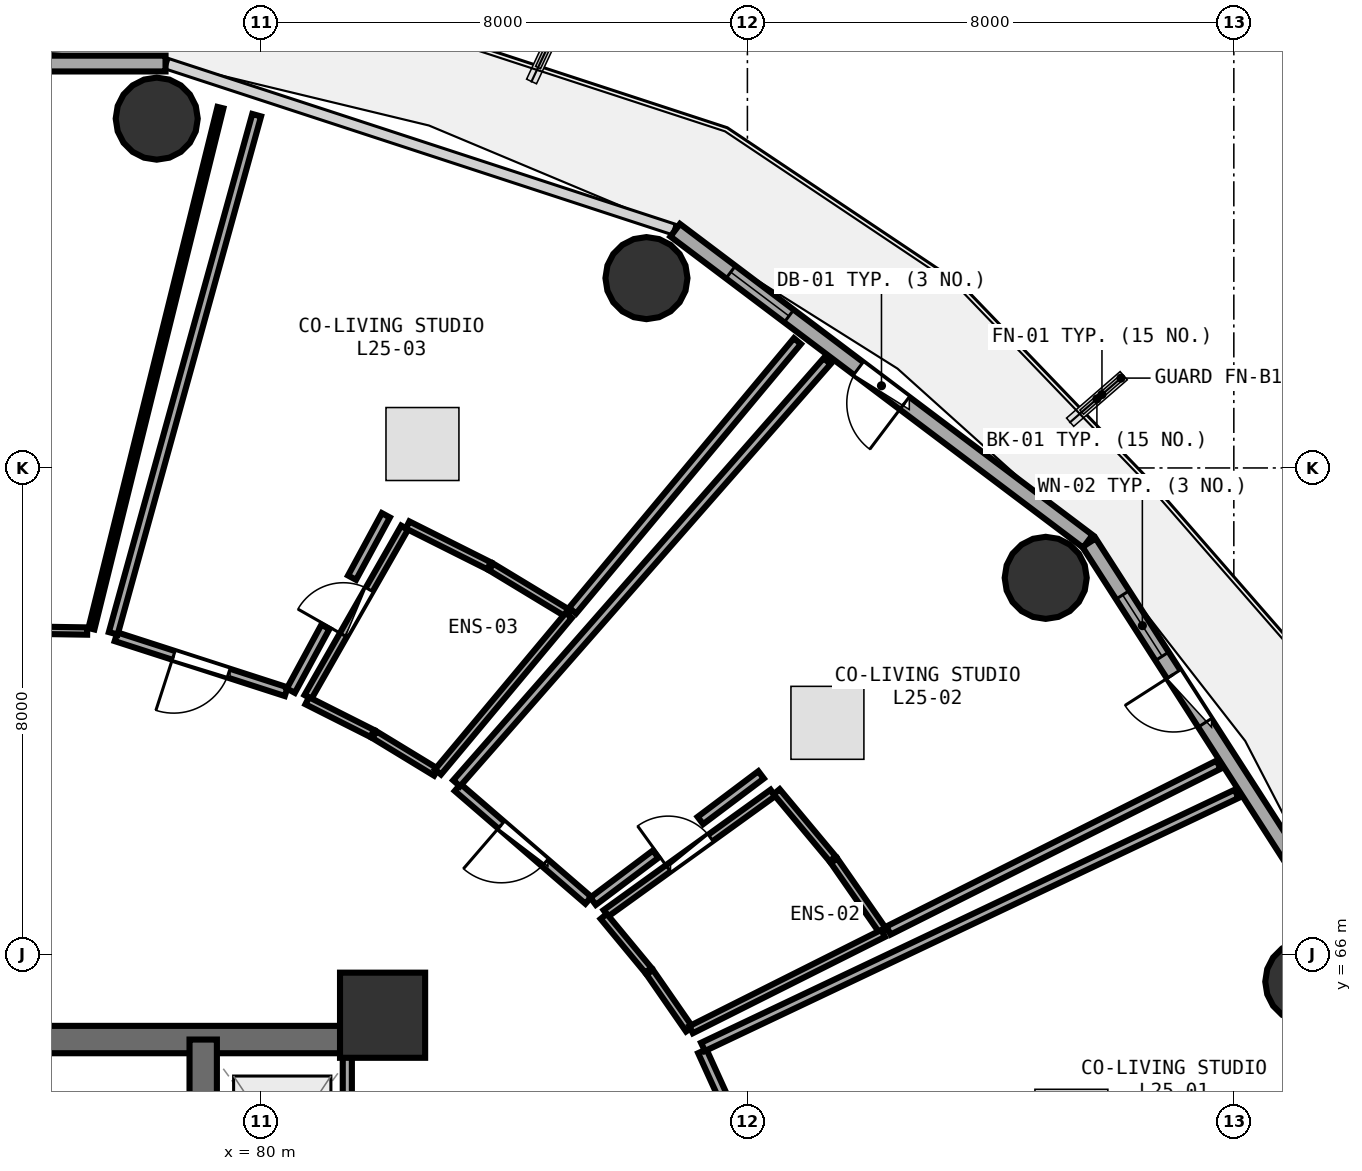
"""IFC4 building model, lengths in metres.
Left out: names, types, materials, properties, quantities, classifications, styles, units other than length and angle.
Written with IfcOpenShell. Run it as: python <this file> out.ifc"""

import sys

from ifc_helpers import new_model, si_unit, direction, frame, frame_2d, origin, origin_2d, place, context, subcontext, project, spatial, rectangle, circle, extrude, element, fill, save


model = new_model("IFC4")
c1 = context("Model", 3, precision=1e-05, world=origin(), true_north=direction((0.0, 1.0)))
c2 = subcontext(c1, "Body", "Model", "MODEL_VIEW")
j1 = project(units=[si_unit("LENGTHUNIT", "METRE"), si_unit("PLANEANGLEUNIT", "RADIAN")], contexts=[c1])
p1 = place(None, origin())
s1 = spatial("IfcSite", under=j1, at=p1, CompositionType="ELEMENT")
p2 = place(p1, origin())
s2 = spatial("IfcBuilding", under=s1, at=p2, CompositionType="ELEMENT")
p3 = place(p2, frame((0.0, 0.0, 98.85)))
s3 = spatial("IfcBuildingStorey", under=s2, at=p3, CompositionType="ELEMENT", Elevation=98.85)
p4 = place(p3, frame((82.0, 65.0, 0.0), z_axis=(0.0, 0.0, 1.0), x_axis=(1.0, 0.0, 0.0)))
e1 = element("IfcColumn", 1, at=p4, inside=s3, PredefinedType="PILASTER", context=c2, shape_type="SweptSolid", body=[
    extrude(rectangle(XDim=1.4, YDim=1.4, at=origin_2d()), origin(), (0.0, 0.0, 1.0), 3.75),
])
for number, where, z_axis, x_axis in (
    (2, (97.192, 65.552, 0.0), (0.0, 0.0, 1.0), (1.0, 0.0, 0.0)),
    (3, (92.906, 72.193, 0.0), (0.0, 0.0, 1.0), (1.0, 0.0, 0.0)),
    (4, (86.34, 77.122, 0.0), (0.0, 0.0, 1.0), (1.0, 0.0, 0.0)),
    (5, (78.286, 79.745, 0.0), (0.0, 0.0, 1.0), (1.0, 0.0, 0.0)),
):
    element("IfcColumn", number, at=place(p3, frame(where, z_axis=z_axis, x_axis=x_axis)), inside=s3, PredefinedType="COLUMN", context=c2, shape_type="SweptSolid", body=[
        extrude(circle(Radius=0.675, at=origin_2d()), origin(), (0.0, 0.0, 1.0), 3.75),
    ])
p5 = place(p3, frame((98.048, 65.879, 0.0), z_axis=(0.0, 0.0, 1.0), x_axis=(-0.540620528459, 0.841266571432, 0.0)))
e6 = element("IfcWall", 6, at=p5, inside=s3, PredefinedType="SOLIDWALL", context=c2, shape_type="SweptSolid", body=[
    extrude(rectangle(XDim=8.193, YDim=0.26, at=frame_2d((4.096, 0.0))), origin(), (0.0, 0.0, 1.0), 3.475),
])
p6 = place(p5, frame((4.671, 0.0, 0.0)))
e7 = element("IfcOpeningElement", 7, at=p6, cuts=e6, PredefinedType="OPENING", context=c2, shape_type="SweptSolid", body=[
    extrude(rectangle(XDim=0.95, YDim=2.1, at=frame_2d((0.475, 1.05))), frame((0.0, 0.14, 0.0), z_axis=(0.0, -1.0, 0.0), x_axis=(1.0, 0.0, 0.0)), (0.0, 0.0, 1.0), 0.28),
])
p7 = place(p5, frame((5.971, 0.0, 0.85)))
e8 = element("IfcOpeningElement", 8, at=p7, cuts=e6, PredefinedType="OPENING", context=c2, shape_type="SweptSolid", body=[
    extrude(rectangle(XDim=1.2, YDim=1.45, at=frame_2d((0.6, 0.725))), frame((0.0, 0.14, 0.0), z_axis=(0.0, -1.0, 0.0), x_axis=(1.0, 0.0, 0.0)), (0.0, 0.0, 1.0), 0.28),
])
p8 = place(p3, frame((93.599, 72.793, 0.0), z_axis=(0.0, 0.0, 1.0), x_axis=(-0.798501507879, 0.601992808857, 0.0)))
e9 = element("IfcWall", 9, at=p8, inside=s3, PredefinedType="SOLIDWALL", context=c2, shape_type="SweptSolid", body=[
    extrude(rectangle(XDim=8.499, YDim=0.26, at=frame_2d((4.25, 0.0))), origin(), (0.0, 0.0, 1.0), 3.475),
])
p9 = place(p8, frame((3.775, 0.0, 0.0)))
e10 = element("IfcOpeningElement", 10, at=p9, cuts=e9, PredefinedType="OPENING", context=c2, shape_type="SweptSolid", body=[
    extrude(rectangle(XDim=0.95, YDim=2.1, at=frame_2d((0.475, 1.05))), frame((0.0, 0.14, 0.0), z_axis=(0.0, -1.0, 0.0), x_axis=(1.0, 0.0, 0.0)), (0.0, 0.0, 1.0), 0.28),
])
p10 = place(p8, frame((6.155, 0.0, 0.85)))
e11 = element("IfcOpeningElement", 11, at=p10, cuts=e9, PredefinedType="OPENING", context=c2, shape_type="SweptSolid", body=[
    extrude(rectangle(XDim=1.2, YDim=1.45, at=frame_2d((0.6, 0.725))), frame((0.0, 0.14, 0.0), z_axis=(0.0, -1.0, 0.0), x_axis=(1.0, 0.0, 0.0)), (0.0, 0.0, 1.0), 0.28),
])
p11 = place(p3, frame((78.43, 80.651, 0.0), z_axis=(0.0, 0.0, 1.0), x_axis=(-1.0, 0.0, 0.0)))
e12 = element("IfcWall", 12, at=p11, inside=s3, PredefinedType="SOLIDWALL", context=c2, shape_type="SweptSolid", body=[
    extrude(rectangle(XDim=8.861, YDim=0.26, at=frame_2d((4.43, 0.0))), origin(), (0.0, 0.0, 1.0), 3.475),
])
p12 = place(p11, frame((3.63, 0.0, 0.85)))
e13 = element("IfcOpeningElement", 13, at=p12, cuts=e12, PredefinedType="OPENING", context=c2, shape_type="SweptSolid", body=[
    extrude(rectangle(XDim=1.6, YDim=1.45, at=frame_2d((0.8, 0.725))), frame((0.0, 0.14, 0.0), z_axis=(0.0, -1.0, 0.0), x_axis=(1.0, 0.0, 0.0)), (0.0, 0.0, 1.0), 0.28),
])
p13 = place(p3, frame((74.0, 64.6, 0.0), z_axis=(0.0, 0.0, 1.0), x_axis=(1.0, 0.0, 0.0)))
e14 = element("IfcWall", 14, at=p13, inside=s3, PredefinedType="SHEAR", context=c2, shape_type="SweptSolid", body=[
    extrude(rectangle(XDim=8.0, YDim=0.45, at=frame_2d((4.0, 0.0))), origin(), (0.0, 0.0, 1.0), 3.49),
])
p14 = place(p3, frame((79.05, 58.3, 0.0), z_axis=(0.0, 0.0, 1.0), x_axis=(0.0, 1.0, 0.0)))
e15 = element("IfcWall", 15, at=p14, inside=s3, PredefinedType="SHEAR", context=c2, shape_type="SweptSolid", body=[
    extrude(rectangle(XDim=6.3, YDim=0.45, at=frame_2d((3.15, 0.0))), origin(), (0.0, 0.0, 1.0), 3.49),
])
p15 = place(p3, frame((81.42, 61.48, 0.0), z_axis=(0.0, 0.0, 1.0), x_axis=(0.0, 1.0, 0.0)))
e16 = element("IfcWall", 16, at=p15, inside=s3, PredefinedType="PARTITIONING", context=c2, shape_type="SweptSolid", body=[
    extrude(rectangle(XDim=2.84, YDim=0.15, at=frame_2d((1.42, 0.0))), origin(), (0.0, 0.0, 1.0), 3.48),
])
p16 = place(p3, frame((88.387, 61.925, 0.0), z_axis=(0.0, 0.0, 1.0), x_axis=(-0.413748987938, 0.910391001153, 0.0)))
e17 = element("IfcWall", 17, at=p16, inside=s3, PredefinedType="PARTITIONING", context=c2, shape_type="SweptSolid", body=[
    extrude(rectangle(XDim=2.727, YDim=0.15, at=frame_2d((1.364, 0.0))), origin(), (0.0, 0.0, 1.0), 3.235),
])
p17 = place(p16, frame((0.889, 0.0, 0.0)))
e18 = element("IfcOpeningElement", 18, at=p17, cuts=e17, PredefinedType="OPENING", context=c2, shape_type="SweptSolid", body=[
    extrude(rectangle(XDim=0.95, YDim=2.08, at=frame_2d((0.475, 1.04))), frame((0.0, 0.085, 0.0), z_axis=(0.0, -1.0, 0.0), x_axis=(1.0, 0.0, 0.0)), (0.0, 0.0, 1.0), 0.17),
])
p18 = place(p3, frame((85.673, 66.676, 0.0), z_axis=(0.0, 0.0, 1.0), x_axis=(0.811192287952, 0.584779507137, 0.0)))
e19 = element("IfcWall", 19, at=p18, inside=s3, PredefinedType="PLUMBINGWALL", context=c2, shape_type="SweptSolid", body=[
    extrude(rectangle(XDim=3.386, YDim=0.13, at=frame_2d((1.693, 0.0))), origin(), (0.0, 0.0, 1.0), 3.235),
])
p19 = place(p18, frame((1.263, 0.0, 0.0)))
e20 = element("IfcOpeningElement", 20, at=p19, cuts=e19, PredefinedType="OPENING", context=c2, shape_type="SweptSolid", body=[
    extrude(rectangle(XDim=0.86, YDim=2.05, at=frame_2d((0.43, 1.025))), frame((0.0, 0.075, 0.0), z_axis=(0.0, -1.0, 0.0), x_axis=(1.0, 0.0, 0.0)), (0.0, 0.0, 1.0), 0.15),
])
p20 = place(p3, frame((85.385, 66.89, 0.0), z_axis=(0.0, 0.0, 1.0), x_axis=(-0.756913909666, 0.65351460072, 0.0)))
e21 = element("IfcWall", 21, at=p20, inside=s3, PredefinedType="PARTITIONING", context=c2, shape_type="SweptSolid", body=[
    extrude(rectangle(XDim=2.838, YDim=0.15, at=frame_2d((1.419, 0.0))), origin(), (0.0, 0.0, 1.0), 2.925),
])
p21 = place(p20, frame((0.944, 0.0, 0.0)))
e22 = element("IfcOpeningElement", 22, at=p21, cuts=e21, PredefinedType="OPENING", context=c2, shape_type="SweptSolid", body=[
    extrude(rectangle(XDim=0.95, YDim=2.08, at=frame_2d((0.475, 1.04))), frame((0.0, 0.085, 0.0), z_axis=(0.0, -1.0, 0.0), x_axis=(1.0, 0.0, 0.0)), (0.0, 0.0, 1.0), 0.17),
])
p22 = place(p3, frame((80.773, 70.233, 0.0), z_axis=(0.0, 0.0, 1.0), x_axis=(0.49568821927, 0.868500540747, 0.0)))
e23 = element("IfcWall", 23, at=p22, inside=s3, PredefinedType="PLUMBINGWALL", context=c2, shape_type="SweptSolid", body=[
    extrude(rectangle(XDim=3.209, YDim=0.13, at=frame_2d((1.604, 0.0))), origin(), (0.0, 0.0, 1.0), 2.925),
])
p23 = place(p22, frame((1.174, 0.0, 0.0)))
e24 = element("IfcOpeningElement", 24, at=p23, cuts=e23, PredefinedType="OPENING", context=c2, shape_type="SweptSolid", body=[
    extrude(rectangle(XDim=0.86, YDim=2.05, at=frame_2d((0.43, 1.025))), frame((0.0, 0.075, 0.0), z_axis=(0.0, -1.0, 0.0), x_axis=(1.0, 0.0, 0.0)), (0.0, 0.0, 1.0), 0.15),
])
p24 = place(p3, frame((80.415, 70.32, 0.0), z_axis=(0.0, 0.0, 1.0), x_axis=(-0.951622481895, 0.307269673009, 0.0)))
e25 = element("IfcWall", 25, at=p24, inside=s3, PredefinedType="PARTITIONING", context=c2, shape_type="SweptSolid", body=[
    extrude(rectangle(XDim=2.94, YDim=0.15, at=frame_2d((1.47, 0.0))), origin(), (0.0, 0.0, 1.0), 3.235),
])
p25 = place(p24, frame((0.995, 0.0, 0.0)))
e26 = element("IfcOpeningElement", 26, at=p25, cuts=e25, PredefinedType="OPENING", context=c2, shape_type="SweptSolid", body=[
    extrude(rectangle(XDim=0.95, YDim=2.08, at=frame_2d((0.475, 1.04))), frame((0.0, 0.085, 0.0), z_axis=(0.0, -1.0, 0.0), x_axis=(1.0, 0.0, 0.0)), (0.0, 0.0, 1.0), 0.17),
])
p26 = place(p3, frame((77.142, 71.318, 0.0), z_axis=(0.0, 0.0, 1.0), x_axis=(-0.999874771211, 0.015825356091, 0.0)))
e27 = element("IfcWall", 27, at=p26, inside=s3, PredefinedType="PARTITIONING", context=c2, shape_type="SweptSolid", body=[
    extrude(rectangle(XDim=5.77, YDim=0.12, at=frame_2d((2.885, 0.0))), origin(), (0.0, 0.0, 1.0), 3.48),
])
p27 = place(p26, frame((2.435, 0.0, 0.0)))
e28 = element("IfcOpeningElement", 28, at=p27, cuts=e27, PredefinedType="OPENING", context=c2, shape_type="SweptSolid", body=[
    extrude(rectangle(XDim=0.9, YDim=2.08, at=frame_2d((0.45, 1.04))), frame((0.0, 0.07, 0.0), z_axis=(0.0, -1.0, 0.0), x_axis=(1.0, 0.0, 0.0)), (0.0, 0.0, 1.0), 0.14),
])
p28 = place(p3, frame((87.27, 64.479, 0.0), z_axis=(0.0, 0.0, 1.0), x_axis=(0.903543765611, 0.428495815178, 0.0)))
e29 = element("IfcWall", 29, at=p28, inside=s3, PredefinedType="PARTITIONING", context=c2, shape_type="SweptSolid", body=[
    extrude(rectangle(XDim=9.713, YDim=0.15, at=frame_2d((4.856, 0.0))), origin(), (0.0, 0.0, 1.0), 2.925),
])
p29 = place(p3, frame((87.045, 64.769, 0.0), z_axis=(0.0, 0.0, 1.0), x_axis=(-0.569710294604, 0.821845593906, 0.0)))
e30 = element("IfcWall", 30, at=p29, inside=s3, PredefinedType="PLUMBINGWALL", context=c2, shape_type="SweptSolid", body=[
    extrude(rectangle(XDim=1.142, YDim=0.13, at=frame_2d((0.571, 0.0))), origin(), (0.0, 0.0, 1.0), 2.925),
])
p30 = place(p3, frame((86.37, 65.74, 0.0), z_axis=(0.0, 0.0, 1.0), x_axis=(-0.63765459476, 0.770322411579, 0.0)))
e31 = element("IfcWall", 31, at=p30, inside=s3, PredefinedType="PLUMBINGWALL", context=c2, shape_type="SweptSolid", body=[
    extrude(rectangle(XDim=1.15, YDim=0.13, at=frame_2d((0.575, 0.0))), origin(), (0.0, 0.0, 1.0), 3.48),
])
p31 = place(p3, frame((88.481, 68.676, 0.0), z_axis=(0.0, 0.0, 1.0), x_axis=(0.640685734907, -0.767803222894, 0.0)))
e32 = element("IfcWall", 32, at=p31, inside=s3, PredefinedType="PLUMBINGWALL", context=c2, shape_type="SweptSolid", body=[
    extrude(rectangle(XDim=1.437, YDim=0.13, at=frame_2d((0.718, 0.0))), origin(), (0.0, 0.0, 1.0), 3.48),
])
p32 = place(p3, frame((89.425, 67.541, 0.0), z_axis=(0.0, 0.0, 1.0), x_axis=(0.571009238548, -0.820943633566, 0.0)))
e33 = element("IfcWall", 33, at=p32, inside=s3, PredefinedType="PLUMBINGWALL", context=c2, shape_type="SweptSolid", body=[
    extrude(rectangle(XDim=1.424, YDim=0.13, at=frame_2d((0.712, 0.0))), origin(), (0.0, 0.0, 1.0), 3.48),
])
p33 = place(p3, frame((90.232, 66.346, 0.0), z_axis=(0.0, 0.0, 1.0), x_axis=(-0.893873710096, -0.448318849034, 0.0)))
e34 = element("IfcWall", 34, at=p33, inside=s3, PredefinedType="PLUMBINGWALL", context=c2, shape_type="SweptSolid", body=[
    extrude(rectangle(XDim=3.533, YDim=0.13, at=frame_2d((1.767, 0.0))), origin(), (0.0, 0.0, 1.0), 2.925),
])
p34 = place(p3, frame((83.217, 68.814, 0.0), z_axis=(0.0, 0.0, 1.0), x_axis=(0.659635901966, 0.751585309088, 0.0)))
e35 = element("IfcWall", 35, at=p34, inside=s3, PredefinedType="PARTITIONING", context=c2, shape_type="SweptSolid", body=[
    extrude(rectangle(XDim=9.237, YDim=0.15, at=frame_2d((4.619, 0.0))), origin(), (0.0, 0.0, 1.0), 2.925),
])
p35 = place(p3, frame((95.749, 69.12, 0.0), z_axis=(0.0, 0.0, 1.0), x_axis=(-0.89358164897, -0.448900697954, 0.0)))
e36 = element("IfcWall", 36, at=p35, inside=s3, PredefinedType="PARTITIONING", context=c2, shape_type="SweptSolid", body=[
    extrude(rectangle(XDim=6.075, YDim=0.15, at=frame_2d((3.038, 0.0))), origin(), (0.0, 0.0, 1.0), 2.975),
])
p36 = place(p3, frame((88.225, 68.953, 0.0), z_axis=(0.0, 0.0, 1.0), x_axis=(-0.799225323022, -0.601031515846, 0.0)))
e37 = element("IfcWall", 37, at=p36, inside=s3, PredefinedType="PARTITIONING", context=c2, shape_type="SweptSolid", body=[
    extrude(rectangle(XDim=1.249, YDim=0.15, at=frame_2d((0.625, 0.0))), origin(), (0.0, 0.0, 1.0), 2.925),
])
p37 = place(p3, frame((86.491, 67.649, 0.0), z_axis=(0.0, 0.0, 1.0), x_axis=(-0.799180360415, -0.601091300492, 0.0)))
e38 = element("IfcWall", 38, at=p37, inside=s3, PredefinedType="PARTITIONING", context=c2, shape_type="SweptSolid", body=[
    extrude(rectangle(XDim=1.288, YDim=0.15, at=frame_2d((0.644, 0.0))), origin(), (0.0, 0.0, 1.0), 3.235),
])
p38 = place(p3, frame((82.881, 68.995, 0.0), z_axis=(0.0, 0.0, 1.0), x_axis=(-0.854269908405, 0.51982970634, 0.0)))
e39 = element("IfcWall", 39, at=p38, inside=s3, PredefinedType="PLUMBINGWALL", context=c2, shape_type="SweptSolid", body=[
    extrude(rectangle(XDim=1.189, YDim=0.13, at=frame_2d((0.595, 0.0))), origin(), (0.0, 0.0, 1.0), 3.48),
])
p39 = place(p3, frame((81.83, 69.633, 0.0), z_axis=(0.0, 0.0, 1.0), x_axis=(-0.89291318054, 0.450228888475, 0.0)))
e40 = element("IfcWall", 40, at=p39, inside=s3, PredefinedType="PLUMBINGWALL", context=c2, shape_type="SweptSolid", body=[
    extrude(rectangle(XDim=1.197, YDim=0.13, at=frame_2d((0.599, 0.0))), origin(), (0.0, 0.0, 1.0), 2.925),
])
p40 = place(p3, frame((82.411, 73.063, 0.0), z_axis=(0.0, 0.0, 1.0), x_axis=(0.893970784776, -0.448125245848, 0.0)))
e41 = element("IfcWall", 41, at=p40, inside=s3, PredefinedType="PLUMBINGWALL", context=c2, shape_type="SweptSolid", body=[
    extrude(rectangle(XDim=1.499, YDim=0.13, at=frame_2d((0.75, 0.0))), origin(), (0.0, 0.0, 1.0), 3.175),
])
p41 = place(p3, frame((83.786, 72.372, 0.0), z_axis=(0.0, 0.0, 1.0), x_axis=(0.855341160713, -0.518065149175, 0.0)))
e42 = element("IfcWall", 42, at=p41, inside=s3, PredefinedType="PLUMBINGWALL", context=c2, shape_type="SweptSolid", body=[
    extrude(rectangle(XDim=1.487, YDim=0.13, at=frame_2d((0.743, 0.0))), origin(), (0.0, 0.0, 1.0), 2.925),
])
p42 = place(p3, frame((85.062, 71.576, 0.0), z_axis=(0.0, 0.0, 1.0), x_axis=(-0.641092758396, -0.767463403123, 0.0)))
e43 = element("IfcWall", 43, at=p42, inside=s3, PredefinedType="PLUMBINGWALL", context=c2, shape_type="SweptSolid", body=[
    extrude(rectangle(XDim=3.356, YDim=0.13, at=frame_2d((1.678, 0.0))), origin(), (0.0, 0.0, 1.0), 2.925),
])
p43 = place(p3, frame((77.571, 71.281, 0.0), z_axis=(0.0, 0.0, 1.0), x_axis=(0.266746506471, 0.963766725554, 0.0)))
e44 = element("IfcWall", 44, at=p43, inside=s3, PredefinedType="PARTITIONING", context=c2, shape_type="SweptSolid", body=[
    extrude(rectangle(XDim=8.841, YDim=0.15, at=frame_2d((4.421, 0.0))), origin(), (0.0, 0.0, 1.0), 2.925),
])
p44 = place(p3, frame((88.823, 76.086, 0.0), z_axis=(0.0, 0.0, 1.0), x_axis=(-0.640629420745, -0.767850210182, 0.0)))
e45 = element("IfcWall", 45, at=p44, inside=s3, PredefinedType="PARTITIONING", context=c2, shape_type="SweptSolid", body=[
    extrude(rectangle(XDim=5.772, YDim=0.15, at=frame_2d((2.886, 0.0))), origin(), (0.0, 0.0, 1.0), 2.975),
])
p45 = place(p3, frame((82.054, 73.222, 0.0), z_axis=(0.0, 0.0, 1.0), x_axis=(-0.476431432847, -0.879211629698, 0.0)))
e46 = element("IfcWall", 46, at=p45, inside=s3, PredefinedType="PARTITIONING", context=c2, shape_type="SweptSolid", body=[
    extrude(rectangle(XDim=1.167, YDim=0.15, at=frame_2d((0.583, 0.0))), origin(), (0.0, 0.0, 1.0), 3.175),
])
p46 = place(p3, frame((81.06, 71.387, 0.0), z_axis=(0.0, 0.0, 1.0), x_axis=(-0.476184304259, -0.879345500004, 0.0)))
e47 = element("IfcWall", 47, at=p46, inside=s3, PredefinedType="PARTITIONING", context=c2, shape_type="SweptSolid", body=[
    extrude(rectangle(XDim=1.194, YDim=0.15, at=frame_2d((0.597, 0.0))), origin(), (0.0, 0.0, 1.0), 2.925),
])
p47 = place(p3, frame((79.333, 79.925, 0.0), z_axis=(0.0, 0.0, 1.0), x_axis=(-0.240342194274, -0.970688224741, 0.0)))
e48 = element("IfcWall", 48, at=p47, inside=s3, PredefinedType="PARTITIONING", context=c2, shape_type="SweptSolid", body=[
    extrude(rectangle(XDim=8.828, YDim=0.1, at=frame_2d((4.414, 0.0))), origin(), (0.0, 0.0, 1.0), 2.925),
])
p48 = place(p6, frame((0.95, 0.0, 0.0), z_axis=(0.0, 0.0, 1.0), x_axis=(-1.0, 0.0, 0.0)))
e49 = element("IfcDoor", 49, at=p48, inside=s3, OperationType="SINGLE_SWING_LEFT", PredefinedType="DOOR", context=c2, shape_type="SweptSolid", body=[
    extrude(rectangle(XDim=0.95, YDim=2.1, at=frame_2d((0.475, 1.05))), frame((0.0, 0.025, 0.0), z_axis=(0.0, -1.0, 0.0), x_axis=(1.0, 0.0, 0.0)), (0.0, 0.0, 1.0), 0.05),
])
fill(e7, e49)
p49 = place(p7, origin())
e50 = element("IfcWindow", 50, at=p49, inside=s3, PartitioningType="SINGLE_PANEL", PredefinedType="WINDOW", context=c2, shape_type="SweptSolid", body=[
    extrude(rectangle(XDim=1.2, YDim=1.45, at=frame_2d((0.6, 0.725))), frame((0.0, 0.03, 0.0), z_axis=(0.0, -1.0, 0.0), x_axis=(1.0, 0.0, 0.0)), (0.0, 0.0, 1.0), 0.06),
])
fill(e8, e50)
p50 = place(p9, frame((0.95, 0.0, 0.0), z_axis=(0.0, 0.0, 1.0), x_axis=(-1.0, 0.0, 0.0)))
e51 = element("IfcDoor", 51, at=p50, inside=s3, OperationType="SINGLE_SWING_RIGHT", PredefinedType="DOOR", context=c2, shape_type="SweptSolid", body=[
    extrude(rectangle(XDim=0.95, YDim=2.1, at=frame_2d((0.475, 1.05))), frame((0.0, 0.025, 0.0), z_axis=(0.0, -1.0, 0.0), x_axis=(1.0, 0.0, 0.0)), (0.0, 0.0, 1.0), 0.05),
])
fill(e10, e51)
p51 = place(p10, origin())
e52 = element("IfcWindow", 52, at=p51, inside=s3, PartitioningType="SINGLE_PANEL", PredefinedType="WINDOW", context=c2, shape_type="SweptSolid", body=[
    extrude(rectangle(XDim=1.2, YDim=1.45, at=frame_2d((0.6, 0.725))), frame((0.0, 0.03, 0.0), z_axis=(0.0, -1.0, 0.0), x_axis=(1.0, 0.0, 0.0)), (0.0, 0.0, 1.0), 0.06),
])
fill(e11, e52)
p52 = place(p19, origin())
e53 = element("IfcDoor", 53, at=p52, inside=s3, OperationType="SINGLE_SWING_LEFT", PredefinedType="DOOR", context=c2, shape_type="SweptSolid", body=[
    extrude(rectangle(XDim=0.86, YDim=2.05, at=frame_2d((0.43, 1.025))), frame((0.0, 0.025, 0.0), z_axis=(0.0, -1.0, 0.0), x_axis=(1.0, 0.0, 0.0)), (0.0, 0.0, 1.0), 0.05),
])
fill(e20, e53)
p53 = place(p21, origin())
e54 = element("IfcDoor", 54, at=p53, inside=s3, OperationType="SINGLE_SWING_RIGHT", PredefinedType="DOOR", context=c2, shape_type="SweptSolid", body=[
    extrude(rectangle(XDim=0.95, YDim=2.08, at=frame_2d((0.475, 1.04))), frame((0.0, 0.025, 0.0), z_axis=(0.0, -1.0, 0.0), x_axis=(1.0, 0.0, 0.0)), (0.0, 0.0, 1.0), 0.05),
])
fill(e22, e54)
p54 = place(p23, origin())
e55 = element("IfcDoor", 55, at=p54, inside=s3, OperationType="SINGLE_SWING_LEFT", PredefinedType="DOOR", context=c2, shape_type="SweptSolid", body=[
    extrude(rectangle(XDim=0.86, YDim=2.05, at=frame_2d((0.43, 1.025))), frame((0.0, 0.025, 0.0), z_axis=(0.0, -1.0, 0.0), x_axis=(1.0, 0.0, 0.0)), (0.0, 0.0, 1.0), 0.05),
])
fill(e24, e55)
p55 = place(p25, origin())
e56 = element("IfcDoor", 56, at=p55, inside=s3, OperationType="SINGLE_SWING_RIGHT", PredefinedType="DOOR", context=c2, shape_type="SweptSolid", body=[
    extrude(rectangle(XDim=0.95, YDim=2.08, at=frame_2d((0.475, 1.04))), frame((0.0, 0.025, 0.0), z_axis=(0.0, -1.0, 0.0), x_axis=(1.0, 0.0, 0.0)), (0.0, 0.0, 1.0), 0.05),
])
fill(e26, e56)
save(model, sys.argv[1])
